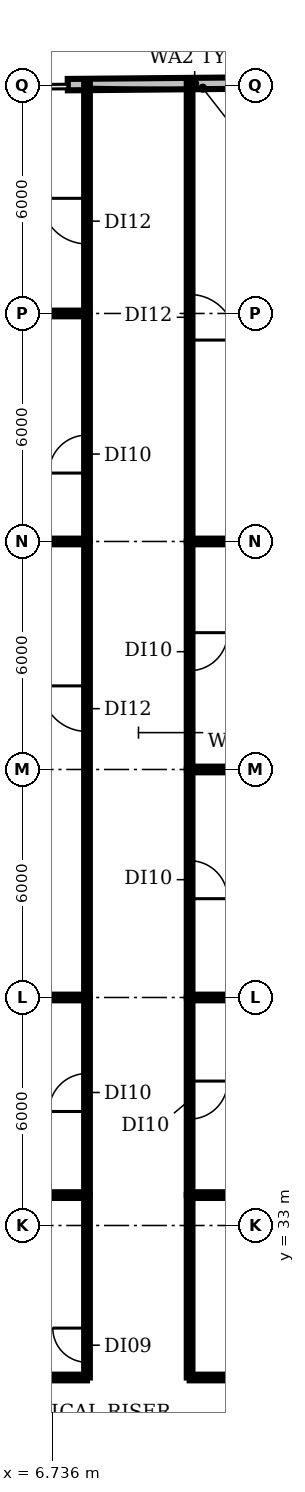
"""IFC4 building model, lengths in metres.
Left out: names, types, materials, properties, quantities, classifications, styles, units other than length and angle.
Written with IfcOpenShell. Run it as: python <this file> out.ifc"""

import sys

from ifc_helpers import new_model, si_unit, direction, frame, frame_2d, origin, place, context, subcontext, project, spatial, rectangle, extrude, element, fill, save


model = new_model("IFC4")
c1 = context("Model", 3, precision=1e-05, world=origin(), true_north=direction((0.0, 1.0)))
c2 = subcontext(c1, "Body", "Model", "MODEL_VIEW")
j1 = project(units=[si_unit("LENGTHUNIT", "METRE"), si_unit("PLANEANGLEUNIT", "RADIAN")], contexts=[c1])
p1 = place(None, origin())
s1 = spatial("IfcSite", under=j1, at=p1, CompositionType="ELEMENT")
p2 = place(p1, origin())
s2 = spatial("IfcBuilding", under=s1, at=p2, CompositionType="ELEMENT")
p3 = place(p2, frame((0.0, 0.0, 289.4)))
s3 = spatial("IfcBuildingStorey", under=s2, at=p3, CompositionType="ELEMENT", Elevation=289.4)
p4 = place(p3, frame((13.821, 63.08, 0.0), z_axis=(0.0, 0.0, 1.0), x_axis=(-0.999961815264, -0.008738879401, 0.0)))
e1 = element("IfcWall", 1, at=p4, inside=s3, PredefinedType="SOLIDWALL", context=c2, shape_type="SweptSolid", body=[
    extrude(rectangle(XDim=6.677, YDim=0.3, at=frame_2d((3.338, 0.0))), origin(), (0.0, 0.0, 1.0), 3.85),
])
p5 = place(p3, frame((-1.216, 57.0, 0.0), z_axis=(0.0, 0.0, 1.0), x_axis=(1.0, 0.0, 0.0)))
e2 = element("IfcWall", 2, at=p5, inside=s3, PredefinedType="PARTITIONING", context=c2, shape_type="SweptSolid", body=[
    extrude(rectangle(XDim=8.866, YDim=0.15, at=frame_2d((4.433, 0.0))), origin(), (0.0, 0.0, 1.0), 2.9),
])
p6 = place(p3, frame((-1.18, 51.0, 0.0), z_axis=(0.0, 0.0, 1.0), x_axis=(1.0, 0.0, 0.0)))
e3 = element("IfcWall", 3, at=p6, inside=s3, PredefinedType="PARTITIONING", context=c2, shape_type="SweptSolid", body=[
    extrude(rectangle(XDim=8.83, YDim=0.15, at=frame_2d((4.415, 0.0))), origin(), (0.0, 0.0, 1.0), 2.9),
])
p7 = place(p3, frame((-1.07, 39.0, 0.0), z_axis=(0.0, 0.0, 1.0), x_axis=(1.0, 0.0, 0.0)))
e4 = element("IfcWall", 4, at=p7, inside=s3, PredefinedType="PARTITIONING", context=c2, shape_type="SweptSolid", body=[
    extrude(rectangle(XDim=8.72, YDim=0.15, at=frame_2d((4.36, 0.0))), origin(), (0.0, 0.0, 1.0), 2.9),
])
p8 = place(p3, frame((-1.03, 33.8, 0.0), z_axis=(0.0, 0.0, 1.0), x_axis=(1.0, 0.0, 0.0)))
e5 = element("IfcWall", 5, at=p8, inside=s3, PredefinedType="PARTITIONING", context=c2, shape_type="SweptSolid", body=[
    extrude(rectangle(XDim=8.68, YDim=0.15, at=frame_2d((4.34, 0.0))), origin(), (0.0, 0.0, 1.0), 2.9),
])
p9 = place(p3, frame((3.0, 29.0, 0.0), z_axis=(0.0, 0.0, 1.0), x_axis=(1.0, 0.0, 0.0)))
e6 = element("IfcWall", 6, at=p9, inside=s3, PredefinedType="PARTITIONING", context=c2, shape_type="SweptSolid", body=[
    extrude(rectangle(XDim=4.65, YDim=0.15, at=frame_2d((2.325, 0.0))), origin(), (0.0, 0.0, 1.0), 2.9),
])
p10 = place(p3, frame((7.65, 29.0, 0.0), z_axis=(0.0, 0.0, 1.0), x_axis=(0.0, 1.0, 0.0)))
e7 = element("IfcWall", 7, at=p10, inside=s3, PredefinedType="PARTITIONING", context=c2, shape_type="SweptSolid", body=[
    extrude(rectangle(XDim=4.8, YDim=0.15, at=frame_2d((2.4, 0.0))), origin(), (0.0, 0.0, 1.0), 2.9),
])
p11 = place(p10, frame((0.4, 0.0, 0.0)))
e8 = element("IfcOpeningElement", 8, at=p11, cuts=e7, PredefinedType="OPENING", context=c2, shape_type="SweptSolid", body=[
    extrude(rectangle(XDim=0.9, YDim=2.1, at=frame_2d((0.45, 1.05))), frame((0.0, 0.085, 0.0), z_axis=(0.0, -1.0, 0.0), x_axis=(1.0, 0.0, 0.0)), (0.0, 0.0, 1.0), 0.17),
])
p12 = place(p3, frame((7.65, 33.8, 0.0), z_axis=(0.0, 0.0, 1.0), x_axis=(0.0, 1.0, 0.0)))
e9 = element("IfcWall", 9, at=p12, inside=s3, PredefinedType="PARTITIONING", context=c2, shape_type="SweptSolid", body=[
    extrude(rectangle(XDim=5.2, YDim=0.15, at=frame_2d((2.6, 0.0))), origin(), (0.0, 0.0, 1.0), 2.9),
])
p13 = place(p12, frame((2.2, 0.0, 0.0)))
e10 = element("IfcOpeningElement", 10, at=p13, cuts=e9, PredefinedType="OPENING", context=c2, shape_type="SweptSolid", body=[
    extrude(rectangle(XDim=1.0, YDim=2.1, at=frame_2d((0.5, 1.05))), frame((0.0, 0.085, 0.0), z_axis=(0.0, -1.0, 0.0), x_axis=(1.0, 0.0, 0.0)), (0.0, 0.0, 1.0), 0.17),
])
p14 = place(p3, frame((7.65, 39.0, 0.0), z_axis=(0.0, 0.0, 1.0), x_axis=(0.0, 1.0, 0.0)))
e11 = element("IfcWall", 11, at=p14, inside=s3, PredefinedType="PARTITIONING", context=c2, shape_type="SweptSolid", body=[
    extrude(rectangle(XDim=12.0, YDim=0.15, at=frame_2d((6.0, 0.0))), origin(), (0.0, 0.0, 1.0), 2.9),
])
p15 = place(p14, frame((7.0, 0.0, 0.0)))
e12 = element("IfcOpeningElement", 12, at=p15, cuts=e11, PredefinedType="OPENING", context=c2, shape_type="SweptSolid", body=[
    extrude(rectangle(XDim=1.2, YDim=2.1, at=frame_2d((0.6, 1.05))), frame((0.0, 0.085, 0.0), z_axis=(0.0, -1.0, 0.0), x_axis=(1.0, 0.0, 0.0)), (0.0, 0.0, 1.0), 0.17),
])
p16 = place(p3, frame((7.65, 51.0, 0.0), z_axis=(0.0, 0.0, 1.0), x_axis=(0.0, 1.0, 0.0)))
e13 = element("IfcWall", 13, at=p16, inside=s3, PredefinedType="PARTITIONING", context=c2, shape_type="SweptSolid", body=[
    extrude(rectangle(XDim=6.0, YDim=0.15, at=frame_2d((3.0, 0.0))), origin(), (0.0, 0.0, 1.0), 2.9),
])
p17 = place(p16, frame((1.8, 0.0, 0.0)))
e14 = element("IfcOpeningElement", 14, at=p17, cuts=e13, PredefinedType="OPENING", context=c2, shape_type="SweptSolid", body=[
    extrude(rectangle(XDim=1.0, YDim=2.1, at=frame_2d((0.5, 1.05))), frame((0.0, 0.085, 0.0), z_axis=(0.0, -1.0, 0.0), x_axis=(1.0, 0.0, 0.0)), (0.0, 0.0, 1.0), 0.17),
])
p18 = place(p3, frame((7.65, 57.0, 0.0), z_axis=(0.0, 0.0, 1.0), x_axis=(0.0, 1.0, 0.0)))
e15 = element("IfcWall", 15, at=p18, inside=s3, PredefinedType="PARTITIONING", context=c2, shape_type="SweptSolid", body=[
    extrude(rectangle(XDim=6.036, YDim=0.15, at=frame_2d((3.018, 0.0))), origin(), (0.0, 0.0, 1.0), 2.9),
])
p19 = place(p18, frame((1.83, 0.0, 0.0)))
e16 = element("IfcOpeningElement", 16, at=p19, cuts=e15, PredefinedType="OPENING", context=c2, shape_type="SweptSolid", body=[
    extrude(rectangle(XDim=1.2, YDim=2.1, at=frame_2d((0.6, 1.05))), frame((0.0, 0.085, 0.0), z_axis=(0.0, -1.0, 0.0), x_axis=(1.0, 0.0, 0.0)), (0.0, 0.0, 1.0), 0.17),
])
p20 = place(p3, frame((10.35, 29.0, 0.0), z_axis=(0.0, 0.0, 1.0), x_axis=(0.0, 1.0, 0.0)))
e17 = element("IfcWall", 17, at=p20, inside=s3, PredefinedType="PARTITIONING", context=c2, shape_type="SweptSolid", body=[
    extrude(rectangle(XDim=4.8, YDim=0.15, at=frame_2d((2.4, 0.0))), origin(), (0.0, 0.0, 1.0), 2.9),
])
p21 = place(p3, frame((10.35, 29.0, 0.0), z_axis=(0.0, 0.0, 1.0), x_axis=(1.0, 0.0, 0.0)))
e18 = element("IfcWall", 18, at=p21, inside=s3, PredefinedType="PARTITIONING", context=c2, shape_type="SweptSolid", body=[
    extrude(rectangle(XDim=4.05, YDim=0.15, at=frame_2d((2.025, 0.0))), origin(), (0.0, 0.0, 1.0), 2.9),
])
p22 = place(p3, frame((10.35, 33.8, 0.0), z_axis=(0.0, 0.0, 1.0), x_axis=(1.0, 0.0, 0.0)))
e19 = element("IfcWall", 19, at=p22, inside=s3, PredefinedType="PARTITIONING", context=c2, shape_type="SweptSolid", body=[
    extrude(rectangle(XDim=11.03, YDim=0.15, at=frame_2d((5.515, 0.0))), origin(), (0.0, 0.0, 1.0), 2.9),
])
p23 = place(p3, frame((10.35, 39.0, 0.0), z_axis=(0.0, 0.0, 1.0), x_axis=(0.0, -1.0, 0.0)))
e20 = element("IfcWall", 20, at=p23, inside=s3, PredefinedType="PARTITIONING", context=c2, shape_type="SweptSolid", body=[
    extrude(rectangle(XDim=5.2, YDim=0.15, at=frame_2d((2.6, 0.0))), origin(), (0.0, 0.0, 1.0), 2.9),
])
p24 = place(p23, frame((2.2, 0.0, 0.0)))
e21 = element("IfcOpeningElement", 21, at=p24, cuts=e20, PredefinedType="OPENING", context=c2, shape_type="SweptSolid", body=[
    extrude(rectangle(XDim=1.0, YDim=2.1, at=frame_2d((0.5, 1.05))), frame((0.0, 0.085, 0.0), z_axis=(0.0, -1.0, 0.0), x_axis=(1.0, 0.0, 0.0)), (0.0, 0.0, 1.0), 0.17),
])
p25 = place(p3, frame((10.35, 39.0, 0.0), z_axis=(0.0, 0.0, 1.0), x_axis=(1.0, 0.0, 0.0)))
e22 = element("IfcWall", 22, at=p25, inside=s3, PredefinedType="PARTITIONING", context=c2, shape_type="SweptSolid", body=[
    extrude(rectangle(XDim=14.63, YDim=0.15, at=frame_2d((7.315, 0.0))), origin(), (0.0, 0.0, 1.0), 2.9),
])
p26 = place(p3, frame((10.35, 45.0, 0.0), z_axis=(0.0, 0.0, 1.0), x_axis=(0.0, -1.0, 0.0)))
e23 = element("IfcWall", 23, at=p26, inside=s3, PredefinedType="PARTITIONING", context=c2, shape_type="SweptSolid", body=[
    extrude(rectangle(XDim=6.0, YDim=0.15, at=frame_2d((3.0, 0.0))), origin(), (0.0, 0.0, 1.0), 2.9),
])
p27 = place(p26, frame((2.4, 0.0, 0.0)))
e24 = element("IfcOpeningElement", 24, at=p27, cuts=e23, PredefinedType="OPENING", context=c2, shape_type="SweptSolid", body=[
    extrude(rectangle(XDim=1.0, YDim=2.1, at=frame_2d((0.5, 1.05))), frame((0.0, 0.085, 0.0), z_axis=(0.0, -1.0, 0.0), x_axis=(1.0, 0.0, 0.0)), (0.0, 0.0, 1.0), 0.17),
])
p28 = place(p3, frame((10.35, 45.0, 0.0), z_axis=(0.0, 0.0, 1.0), x_axis=(1.0, 0.0, 0.0)))
e25 = element("IfcWall", 25, at=p28, inside=s3, PredefinedType="PARTITIONING", context=c2, shape_type="SweptSolid", body=[
    extrude(rectangle(XDim=14.63, YDim=0.15, at=frame_2d((7.315, 0.0))), origin(), (0.0, 0.0, 1.0), 2.9),
])
p29 = place(p3, frame((10.35, 51.0, 0.0), z_axis=(0.0, 0.0, 1.0), x_axis=(0.0, -1.0, 0.0)))
e26 = element("IfcWall", 26, at=p29, inside=s3, PredefinedType="PARTITIONING", context=c2, shape_type="SweptSolid", body=[
    extrude(rectangle(XDim=6.0, YDim=0.15, at=frame_2d((3.0, 0.0))), origin(), (0.0, 0.0, 1.0), 2.9),
])
p30 = place(p29, frame((2.4, 0.0, 0.0)))
e27 = element("IfcOpeningElement", 27, at=p30, cuts=e26, PredefinedType="OPENING", context=c2, shape_type="SweptSolid", body=[
    extrude(rectangle(XDim=1.0, YDim=2.1, at=frame_2d((0.5, 1.05))), frame((0.0, 0.085, 0.0), z_axis=(0.0, -1.0, 0.0), x_axis=(1.0, 0.0, 0.0)), (0.0, 0.0, 1.0), 0.17),
])
p31 = place(p3, frame((10.35, 51.0, 0.0), z_axis=(0.0, 0.0, 1.0), x_axis=(1.0, 0.0, 0.0)))
e28 = element("IfcWall", 28, at=p31, inside=s3, PredefinedType="PARTITIONING", context=c2, shape_type="SweptSolid", body=[
    extrude(rectangle(XDim=14.63, YDim=0.15, at=frame_2d((7.315, 0.0))), origin(), (0.0, 0.0, 1.0), 2.9),
])
p32 = place(p3, frame((10.35, 63.06, 0.0), z_axis=(0.0, 0.0, 1.0), x_axis=(0.0, -1.0, 0.0)))
e29 = element("IfcWall", 29, at=p32, inside=s3, PredefinedType="PARTITIONING", context=c2, shape_type="SweptSolid", body=[
    extrude(rectangle(XDim=12.06, YDim=0.15, at=frame_2d((6.03, 0.0))), origin(), (0.0, 0.0, 1.0), 2.9),
])
p33 = place(p32, frame((5.56, 0.0, 0.0)))
e30 = element("IfcOpeningElement", 30, at=p33, cuts=e29, PredefinedType="OPENING", context=c2, shape_type="SweptSolid", body=[
    extrude(rectangle(XDim=1.2, YDim=2.1, at=frame_2d((0.6, 1.05))), frame((0.0, 0.085, 0.0), z_axis=(0.0, -1.0, 0.0), x_axis=(1.0, 0.0, 0.0)), (0.0, 0.0, 1.0), 0.17),
])
p34 = place(p11, origin())
e31 = element("IfcDoor", 31, at=p34, inside=s3, OperationType="SINGLE_SWING_RIGHT", PredefinedType="DOOR", context=c2, shape_type="SweptSolid", body=[
    extrude(rectangle(XDim=0.9, YDim=2.1, at=frame_2d((0.45, 1.05))), frame((0.0, 0.025, 0.0), z_axis=(0.0, -1.0, 0.0), x_axis=(1.0, 0.0, 0.0)), (0.0, 0.0, 1.0), 0.05),
])
fill(e8, e31)
p35 = place(p13, origin())
e32 = element("IfcDoor", 32, at=p35, inside=s3, OperationType="SINGLE_SWING_LEFT", PredefinedType="DOOR", context=c2, shape_type="SweptSolid", body=[
    extrude(rectangle(XDim=1.0, YDim=2.1, at=frame_2d((0.5, 1.05))), frame((0.0, 0.025, 0.0), z_axis=(0.0, -1.0, 0.0), x_axis=(1.0, 0.0, 0.0)), (0.0, 0.0, 1.0), 0.05),
])
fill(e10, e32)
p36 = place(p15, origin())
e33 = element("IfcDoor", 33, at=p36, inside=s3, OperationType="SINGLE_SWING_RIGHT", PredefinedType="DOOR", context=c2, shape_type="SweptSolid", body=[
    extrude(rectangle(XDim=1.2, YDim=2.1, at=frame_2d((0.6, 1.05))), frame((0.0, 0.025, 0.0), z_axis=(0.0, -1.0, 0.0), x_axis=(1.0, 0.0, 0.0)), (0.0, 0.0, 1.0), 0.05),
])
fill(e12, e33)
p37 = place(p17, origin())
e34 = element("IfcDoor", 34, at=p37, inside=s3, OperationType="SINGLE_SWING_LEFT", PredefinedType="DOOR", context=c2, shape_type="SweptSolid", body=[
    extrude(rectangle(XDim=1.0, YDim=2.1, at=frame_2d((0.5, 1.05))), frame((0.0, 0.025, 0.0), z_axis=(0.0, -1.0, 0.0), x_axis=(1.0, 0.0, 0.0)), (0.0, 0.0, 1.0), 0.05),
])
fill(e14, e34)
p38 = place(p19, origin())
e35 = element("IfcDoor", 35, at=p38, inside=s3, OperationType="SINGLE_SWING_RIGHT", PredefinedType="DOOR", context=c2, shape_type="SweptSolid", body=[
    extrude(rectangle(XDim=1.2, YDim=2.1, at=frame_2d((0.6, 1.05))), frame((0.0, 0.025, 0.0), z_axis=(0.0, -1.0, 0.0), x_axis=(1.0, 0.0, 0.0)), (0.0, 0.0, 1.0), 0.05),
])
fill(e16, e35)
p39 = place(p24, origin())
e36 = element("IfcDoor", 36, at=p39, inside=s3, OperationType="SINGLE_SWING_LEFT", PredefinedType="DOOR", context=c2, shape_type="SweptSolid", body=[
    extrude(rectangle(XDim=1.0, YDim=2.1, at=frame_2d((0.5, 1.05))), frame((0.0, 0.025, 0.0), z_axis=(0.0, -1.0, 0.0), x_axis=(1.0, 0.0, 0.0)), (0.0, 0.0, 1.0), 0.05),
])
fill(e21, e36)
p40 = place(p27, origin())
e37 = element("IfcDoor", 37, at=p40, inside=s3, OperationType="SINGLE_SWING_RIGHT", PredefinedType="DOOR", context=c2, shape_type="SweptSolid", body=[
    extrude(rectangle(XDim=1.0, YDim=2.1, at=frame_2d((0.5, 1.05))), frame((0.0, 0.025, 0.0), z_axis=(0.0, -1.0, 0.0), x_axis=(1.0, 0.0, 0.0)), (0.0, 0.0, 1.0), 0.05),
])
fill(e24, e37)
p41 = place(p30, origin())
e38 = element("IfcDoor", 38, at=p41, inside=s3, OperationType="SINGLE_SWING_LEFT", PredefinedType="DOOR", context=c2, shape_type="SweptSolid", body=[
    extrude(rectangle(XDim=1.0, YDim=2.1, at=frame_2d((0.5, 1.05))), frame((0.0, 0.025, 0.0), z_axis=(0.0, -1.0, 0.0), x_axis=(1.0, 0.0, 0.0)), (0.0, 0.0, 1.0), 0.05),
])
fill(e27, e38)
p42 = place(p33, origin())
e39 = element("IfcDoor", 39, at=p42, inside=s3, OperationType="SINGLE_SWING_RIGHT", PredefinedType="DOOR", context=c2, shape_type="SweptSolid", body=[
    extrude(rectangle(XDim=1.2, YDim=2.1, at=frame_2d((0.6, 1.05))), frame((0.0, 0.025, 0.0), z_axis=(0.0, -1.0, 0.0), x_axis=(1.0, 0.0, 0.0)), (0.0, 0.0, 1.0), 0.05),
])
fill(e30, e39)
save(model, sys.argv[1])
